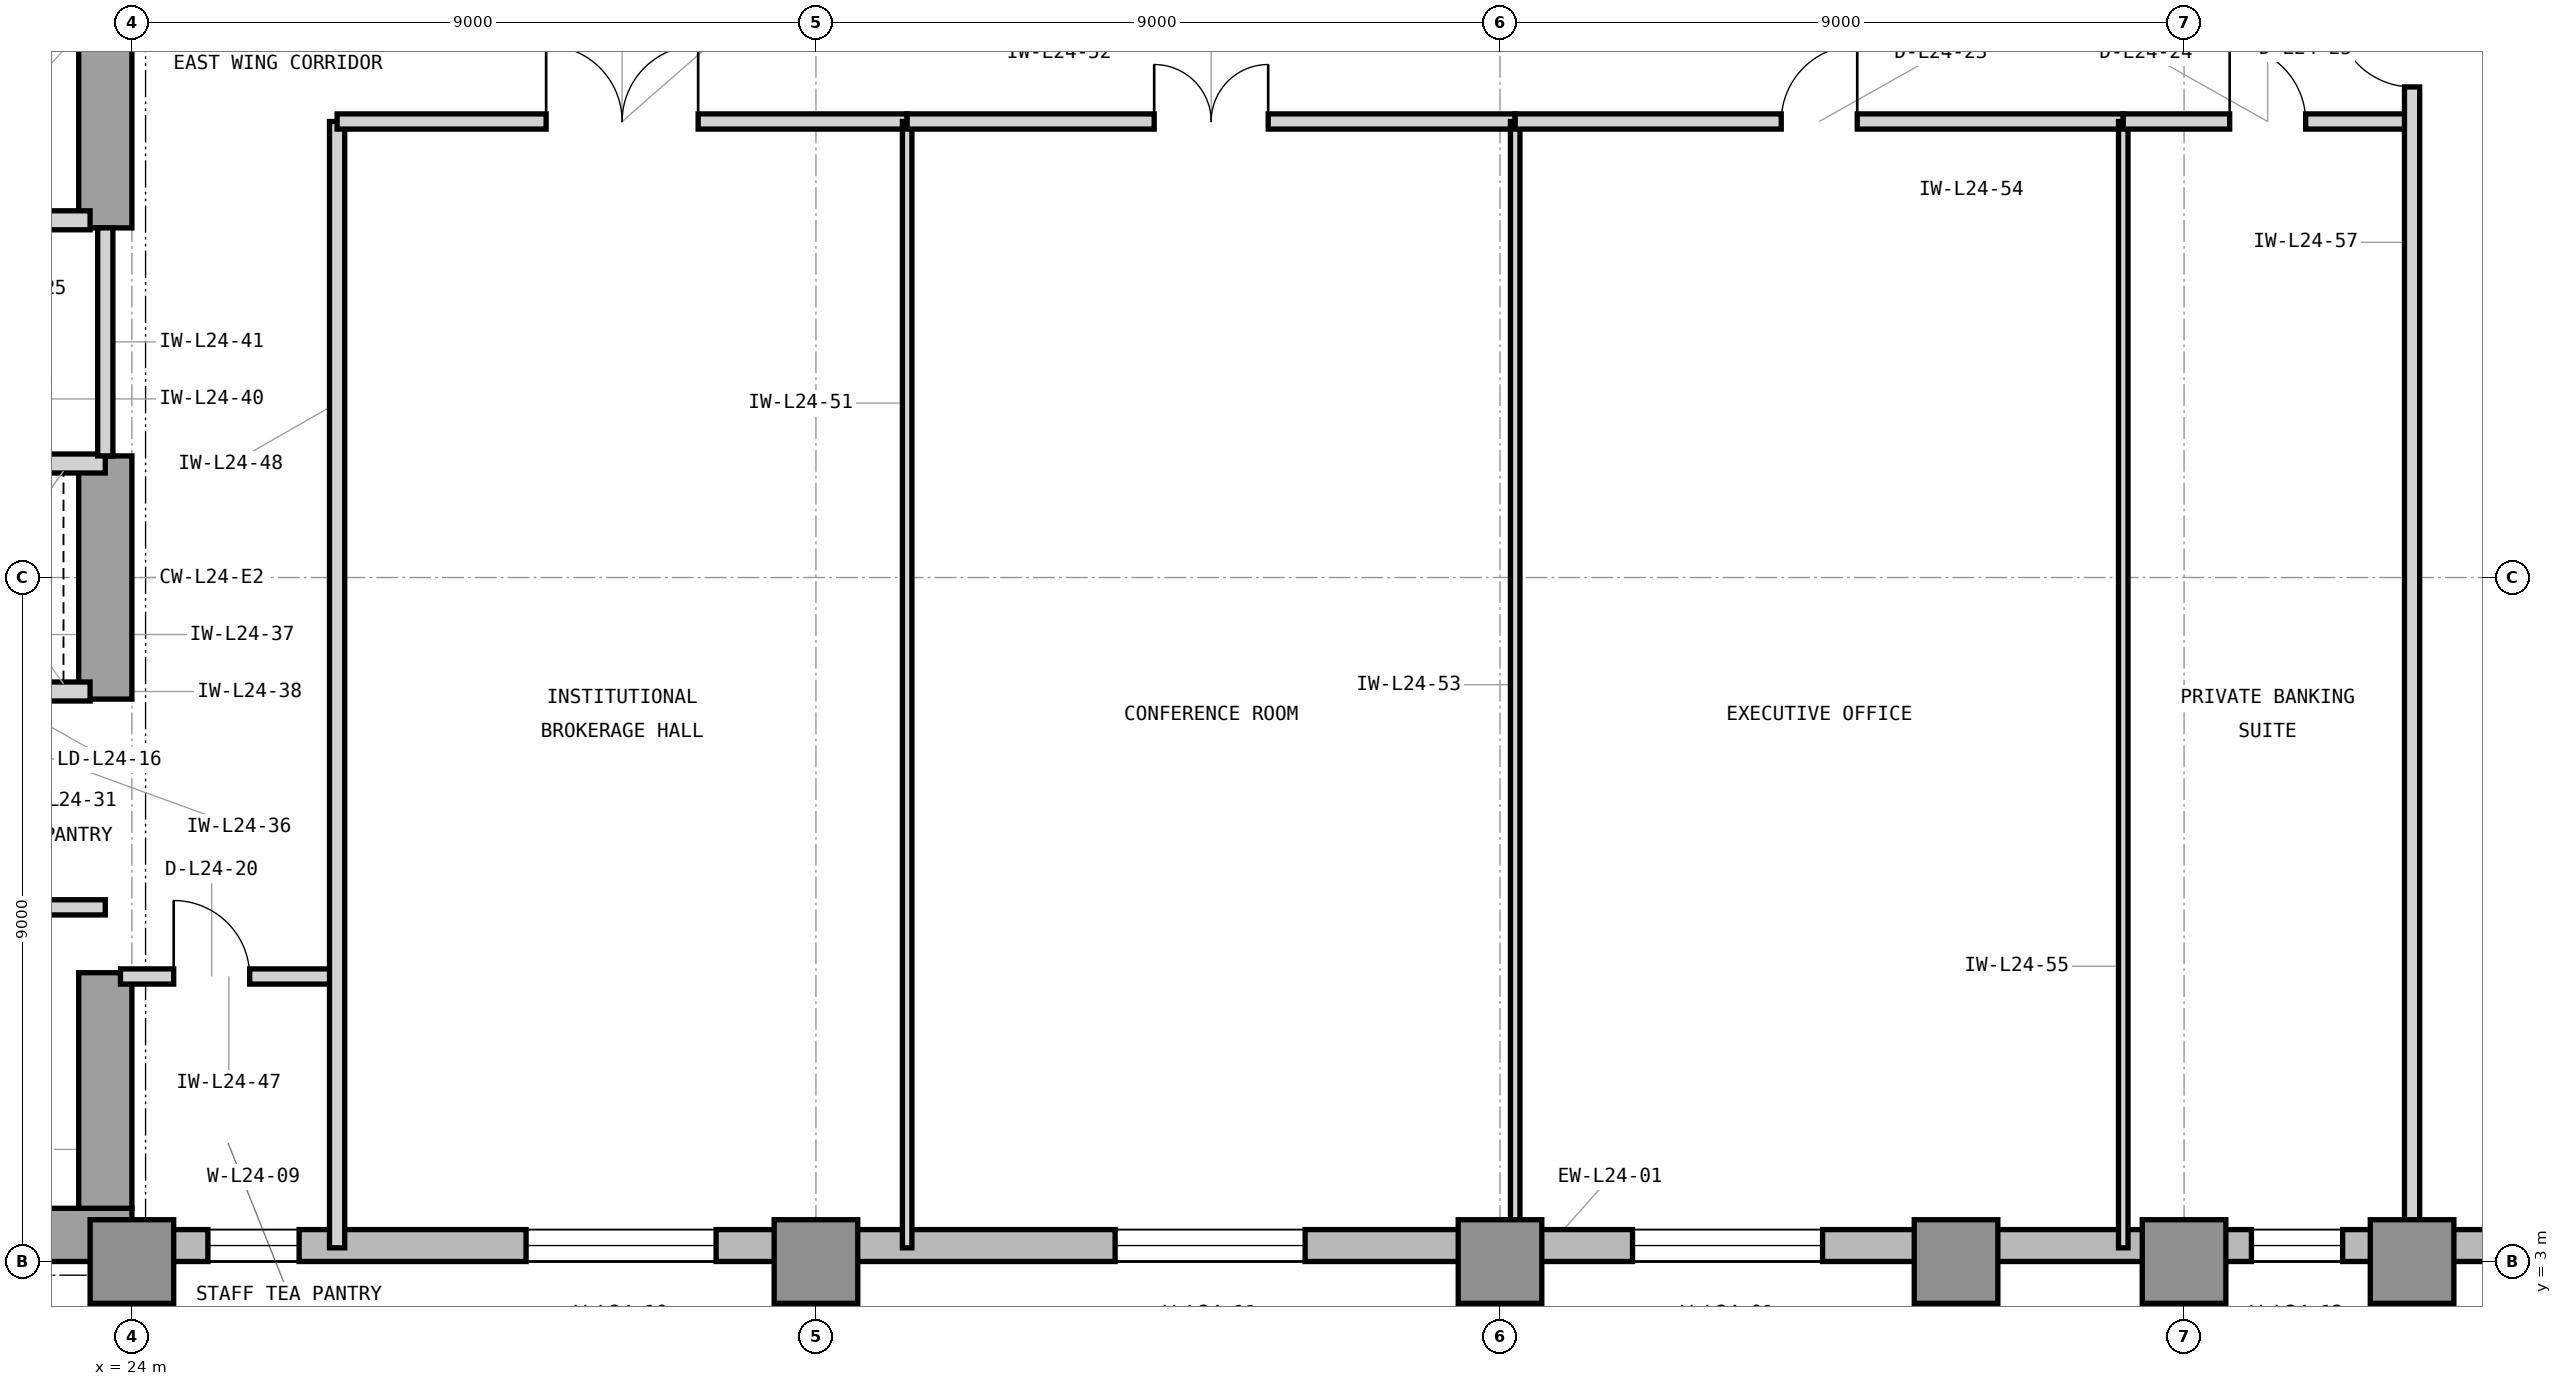
"""IFC4 building model, lengths in metres.
Left out: names, types, materials, properties, quantities, classifications, styles, units other than length and angle.
Written with IfcOpenShell. Run it as: python <this file> out.ifc"""

import sys

from ifc_helpers import new_model, si_unit, direction, frame, frame_2d, origin, origin_2d, place, context, subcontext, project, spatial, rectangle, extrude, element, fill, save


model = new_model("IFC4")
c1 = context("Model", 3, precision=1e-05, world=origin(), true_north=direction((0.0, 1.0)))
c2 = subcontext(c1, "Body", "Model", "MODEL_VIEW")
j1 = project(units=[si_unit("LENGTHUNIT", "METRE"), si_unit("PLANEANGLEUNIT", "RADIAN")], contexts=[c1])
p1 = place(None, origin())
s1 = spatial("IfcSite", under=j1, at=p1, CompositionType="ELEMENT")
p2 = place(p1, origin())
s2 = spatial("IfcBuilding", under=s1, at=p2, CompositionType="ELEMENT")
p3 = place(p2, frame((0.0, 0.0, 105.0)))
s3 = spatial("IfcBuildingStorey", under=s2, at=p3, CompositionType="ELEMENT", Elevation=105.0)
p4 = place(p3, frame((7.475, 3.35, 0.0), z_axis=(0.0, 0.0, 1.0), x_axis=(1.0, 0.0, 0.0)))
e1 = element("IfcWall", 1, at=p4, inside=s3, PredefinedType="SHEAR", context=c2, shape_type="SweptSolid", body=[
    extrude(rectangle(XDim=16.525, YDim=0.7, at=frame_2d((8.262, 0.0))), origin(), (0.0, 0.0, 1.0), 3.9),
])
p5 = place(p3, frame((23.65, 3.7, 0.0), z_axis=(0.0, 0.0, 1.0), x_axis=(0.0, 1.0, 0.0)))
e2 = element("IfcWall", 2, at=p5, inside=s3, PredefinedType="SHEAR", context=c2, shape_type="SweptSolid", body=[
    extrude(rectangle(XDim=3.1, YDim=0.7, at=frame_2d((1.55, 0.0))), origin(), (0.0, 0.0, 1.0), 3.9),
])
p6 = place(p3, frame((23.65, 10.4, 0.0), z_axis=(0.0, 0.0, 1.0), x_axis=(0.0, 1.0, 0.0)))
e3 = element("IfcWall", 3, at=p6, inside=s3, PredefinedType="SHEAR", context=c2, shape_type="SweptSolid", body=[
    extrude(rectangle(XDim=3.2, YDim=0.7, at=frame_2d((1.6, 0.0))), origin(), (0.0, 0.0, 1.0), 3.9),
])
p7 = place(p3, frame((23.65, 16.6, 0.0), z_axis=(0.0, 0.0, 1.0), x_axis=(0.0, 1.0, 0.0)))
e4 = element("IfcWall", 4, at=p7, inside=s3, PredefinedType="SHEAR", context=c2, shape_type="SweptSolid", body=[
    extrude(rectangle(XDim=4.05, YDim=0.7, at=frame_2d((2.025, 0.0))), origin(), (0.0, 0.0, 1.0), 3.9),
])
for number, where, z_axis, x_axis in (
    (5, (24.0, 3.0, 0.0), (0.0, 0.0, 1.0), (1.0, 0.0, 0.0)),
    (6, (33.0, 3.0, 0.0), (0.0, 0.0, 1.0), (1.0, 0.0, 0.0)),
    (7, (42.0, 3.0, 0.0), (0.0, 0.0, 1.0), (1.0, 0.0, 0.0)),
    (8, (48.0, 3.0, 0.0), (0.0, 0.0, 1.0), (1.0, 0.0, 0.0)),
    (9, (51.0, 3.0, 0.0), (0.0, 0.0, 1.0), (1.0, 0.0, 0.0)),
    (10, (54.0, 3.0, 0.0), (0.0, 0.0, 1.0), (1.0, 0.0, 0.0)),
):
    element("IfcColumn", number, at=place(p3, frame(where, z_axis=z_axis, x_axis=x_axis)), inside=s3, PredefinedType="COLUMN", context=c2, shape_type="SweptSolid", body=[
        extrude(rectangle(XDim=1.1, YDim=1.1, at=origin_2d()), origin(), (0.0, 0.0, 1.0), 3.9),
    ])
p8 = place(p3, frame((23.9, 3.21, 0.0), z_axis=(0.0, 0.0, 1.0), x_axis=(1.0, 0.0, 0.0)))
e11 = element("IfcWall", 11, at=p8, inside=s3, PredefinedType="STANDARD", context=c2, shape_type="SweptSolid", body=[
    extrude(rectangle(XDim=37.5, YDim=0.42, at=frame_2d((18.75, 0.0))), origin(), (0.0, 0.0, 1.0), 3.7),
])
p9 = place(p8, frame((19.844, 0.0, 0.85)))
e12 = element("IfcOpeningElement", 12, at=p9, cuts=e11, PredefinedType="OPENING", context=c2, shape_type="SweptSolid", body=[
    extrude(rectangle(XDim=2.5, YDim=2.25, at=frame_2d((1.25, 1.125))), frame((0.0, 0.22, 0.0), z_axis=(0.0, -1.0, 0.0), x_axis=(1.0, 0.0, 0.0)), (0.0, 0.0, 1.0), 0.44),
])
p10 = place(p8, frame((1.1, 0.0, 0.85)))
e13 = element("IfcOpeningElement", 13, at=p10, cuts=e11, PredefinedType="OPENING", context=c2, shape_type="SweptSolid", body=[
    extrude(rectangle(XDim=1.2, YDim=2.25, at=frame_2d((0.6, 1.125))), frame((0.0, 0.22, 0.0), z_axis=(0.0, -1.0, 0.0), x_axis=(1.0, 0.0, 0.0)), (0.0, 0.0, 1.0), 0.44),
])
p11 = place(p8, frame((5.286, 0.0, 0.85)))
e14 = element("IfcOpeningElement", 14, at=p11, cuts=e11, PredefinedType="OPENING", context=c2, shape_type="SweptSolid", body=[
    extrude(rectangle(XDim=2.5, YDim=2.25, at=frame_2d((1.25, 1.125))), frame((0.0, 0.22, 0.0), z_axis=(0.0, -1.0, 0.0), x_axis=(1.0, 0.0, 0.0)), (0.0, 0.0, 1.0), 0.44),
])
p12 = place(p8, frame((13.036, 0.0, 0.85)))
e15 = element("IfcOpeningElement", 15, at=p12, cuts=e11, PredefinedType="OPENING", context=c2, shape_type="SweptSolid", body=[
    extrude(rectangle(XDim=2.5, YDim=2.25, at=frame_2d((1.25, 1.125))), frame((0.0, 0.22, 0.0), z_axis=(0.0, -1.0, 0.0), x_axis=(1.0, 0.0, 0.0)), (0.0, 0.0, 1.0), 0.44),
])
p13 = place(p8, frame((27.986, 0.0, 0.85)))
e16 = element("IfcOpeningElement", 16, at=p13, cuts=e11, PredefinedType="OPENING", context=c2, shape_type="SweptSolid", body=[
    extrude(rectangle(XDim=1.2, YDim=2.25, at=frame_2d((0.6, 1.125))), frame((0.0, 0.22, 0.0), z_axis=(0.0, -1.0, 0.0), x_axis=(1.0, 0.0, 0.0)), (0.0, 0.0, 1.0), 0.44),
])
p14 = place(p3, frame((21.05, 16.7, 0.0), z_axis=(0.0, 0.0, 1.0), x_axis=(1.0, 0.0, 0.0)))
e17 = element("IfcWall", 17, at=p14, inside=s3, PredefinedType="PARTITIONING", context=c2, shape_type="SweptSolid", body=[
    extrude(rectangle(XDim=2.4, YDim=0.25, at=frame_2d((1.2, 0.0))), origin(), (0.0, 0.0, 1.0), 3.227),
])
p15 = place(p3, frame((20.8, 7.66, 0.0), z_axis=(0.0, 0.0, 1.0), x_axis=(1.0, 0.0, 0.0)))
e18 = element("IfcWall", 18, at=p15, inside=s3, PredefinedType="PARTITIONING", context=c2, shape_type="SweptSolid", body=[
    extrude(rectangle(XDim=2.85, YDim=0.2, at=frame_2d((1.425, 0.0))), origin(), (0.0, 0.0, 1.0), 3.69),
])
p16 = place(p15, frame((0.95, 0.0, 0.0)))
e19 = element("IfcOpeningElement", 19, at=p16, cuts=e18, PredefinedType="OPENING", context=c2, shape_type="SweptSolid", body=[
    extrude(rectangle(XDim=0.95, YDim=2.1, at=frame_2d((0.475, 1.05))), frame((0.0, 0.11, 0.0), z_axis=(0.0, -1.0, 0.0), x_axis=(1.0, 0.0, 0.0)), (0.0, 0.0, 1.0), 0.22),
])
p17 = place(p3, frame((21.05, 10.5, 0.0), z_axis=(0.0, 0.0, 1.0), x_axis=(1.0, 0.0, 0.0)))
e20 = element("IfcWall", 20, at=p17, inside=s3, PredefinedType="PARTITIONING", context=c2, shape_type="SweptSolid", body=[
    extrude(rectangle(XDim=2.4, YDim=0.25, at=frame_2d((1.2, 0.0))), origin(), (0.0, 0.0, 1.0), 3.227),
])
p18 = place(p17, frame((0.48, 0.0, 0.0)))
e21 = element("IfcOpeningElement", 21, at=p18, cuts=e20, PredefinedType="OPENING", context=c2, shape_type="SweptSolid", body=[
    extrude(rectangle(XDim=1.15, YDim=2.25, at=frame_2d((0.575, 1.125))), frame((0.0, 0.135, 0.0), z_axis=(0.0, -1.0, 0.0), x_axis=(1.0, 0.0, 0.0)), (0.0, 0.0, 1.0), 0.27),
])
p19 = place(p3, frame((14.7, 13.5, 0.0), z_axis=(0.0, 0.0, 1.0), x_axis=(1.0, 0.0, 0.0)))
e22 = element("IfcWall", 22, at=p19, inside=s3, PredefinedType="PARTITIONING", context=c2, shape_type="SweptSolid", body=[
    extrude(rectangle(XDim=8.95, YDim=0.25, at=frame_2d((4.475, 0.0))), origin(), (0.0, 0.0, 1.0), 3.227),
])
p20 = place(p3, frame((23.65, 13.6, 0.0), z_axis=(0.0, 0.0, 1.0), x_axis=(0.0, 1.0, 0.0)))
e23 = element("IfcWall", 23, at=p20, inside=s3, PredefinedType="PARTITIONING", context=c2, shape_type="SweptSolid", body=[
    extrude(rectangle(XDim=3.0, YDim=0.2, at=frame_2d((1.5, 0.0))), origin(), (0.0, 0.0, 1.0), 3.69),
])
p21 = place(p3, frame((23.85, 6.75, 0.0), z_axis=(0.0, 0.0, 1.0), x_axis=(1.0, 0.0, 0.0)))
e24 = element("IfcWall", 24, at=p21, inside=s3, PredefinedType="PARTITIONING", context=c2, shape_type="SweptSolid", body=[
    extrude(rectangle(XDim=2.85, YDim=0.2, at=frame_2d((1.425, 0.0))), origin(), (0.0, 0.0, 1.0), 3.69),
])
p22 = place(p21, frame((0.7, 0.0, 0.0)))
e25 = element("IfcOpeningElement", 25, at=p22, cuts=e24, PredefinedType="OPENING", context=c2, shape_type="SweptSolid", body=[
    extrude(rectangle(XDim=1.0, YDim=2.15, at=frame_2d((0.5, 1.075))), frame((0.0, 0.11, 0.0), z_axis=(0.0, -1.0, 0.0), x_axis=(1.0, 0.0, 0.0)), (0.0, 0.0, 1.0), 0.22),
])
p23 = place(p3, frame((26.7, 3.18, 0.0), z_axis=(0.0, 0.0, 1.0), x_axis=(0.0, 1.0, 0.0)))
e26 = element("IfcWall", 26, at=p23, inside=s3, PredefinedType="PARTITIONING", context=c2, shape_type="SweptSolid", body=[
    extrude(rectangle(XDim=14.82, YDim=0.2, at=frame_2d((7.41, 0.0))), origin(), (0.0, 0.0, 1.0), 3.69),
])
p24 = place(p3, frame((26.7, 18.0, 0.0), z_axis=(0.0, 0.0, 1.0), x_axis=(1.0, 0.0, 0.0)))
e27 = element("IfcWall", 27, at=p24, inside=s3, PredefinedType="PARTITIONING", context=c2, shape_type="SweptSolid", body=[
    extrude(rectangle(XDim=7.5, YDim=0.2, at=frame_2d((3.75, 0.0))), origin(), (0.0, 0.0, 1.0), 3.227),
])
p25 = place(p24, frame((2.75, 0.0, 0.0)))
e28 = element("IfcOpeningElement", 28, at=p25, cuts=e27, PredefinedType="OPENING", context=c2, shape_type="SweptSolid", body=[
    extrude(rectangle(XDim=2.0, YDim=2.5, at=frame_2d((1.0, 1.25))), frame((0.0, 0.11, 0.0), z_axis=(0.0, -1.0, 0.0), x_axis=(1.0, 0.0, 0.0)), (0.0, 0.0, 1.0), 0.22),
])
p26 = place(p3, frame((34.2, 3.18, 0.0), z_axis=(0.0, 0.0, 1.0), x_axis=(0.0, 1.0, 0.0)))
e29 = element("IfcWall", 29, at=p26, inside=s3, PredefinedType="PARTITIONING", context=c2, shape_type="SweptSolid", body=[
    extrude(rectangle(XDim=14.82, YDim=0.125, at=frame_2d((7.41, 0.0))), origin(), (0.0, 0.0, 1.0), 3.69),
])
p27 = place(p3, frame((34.2, 18.0, 0.0), z_axis=(0.0, 0.0, 1.0), x_axis=(1.0, 0.0, 0.0)))
e30 = element("IfcWall", 30, at=p27, inside=s3, PredefinedType="PARTITIONING", context=c2, shape_type="SweptSolid", body=[
    extrude(rectangle(XDim=8.0, YDim=0.2, at=frame_2d((4.0, 0.0))), origin(), (0.0, 0.0, 1.0), 3.227),
])
p28 = place(p27, frame((3.25, 0.0, 0.0)))
e31 = element("IfcOpeningElement", 31, at=p28, cuts=e30, PredefinedType="OPENING", context=c2, shape_type="SweptSolid", body=[
    extrude(rectangle(XDim=1.5, YDim=2.3, at=frame_2d((0.75, 1.15))), frame((0.0, 0.11, 0.0), z_axis=(0.0, -1.0, 0.0), x_axis=(1.0, 0.0, 0.0)), (0.0, 0.0, 1.0), 0.22),
])
p29 = place(p3, frame((42.2, 3.18, 0.0), z_axis=(0.0, 0.0, 1.0), x_axis=(0.0, 1.0, 0.0)))
e32 = element("IfcWall", 32, at=p29, inside=s3, PredefinedType="PARTITIONING", context=c2, shape_type="SweptSolid", body=[
    extrude(rectangle(XDim=14.82, YDim=0.125, at=frame_2d((7.41, 0.0))), origin(), (0.0, 0.0, 1.0), 3.69),
])
p30 = place(p3, frame((42.2, 18.0, 0.0), z_axis=(0.0, 0.0, 1.0), x_axis=(1.0, 0.0, 0.0)))
e33 = element("IfcWall", 33, at=p30, inside=s3, PredefinedType="PARTITIONING", context=c2, shape_type="SweptSolid", body=[
    extrude(rectangle(XDim=8.0, YDim=0.2, at=frame_2d((4.0, 0.0))), origin(), (0.0, 0.0, 1.0), 3.227),
])
p31 = place(p30, frame((3.5, 0.0, 0.0)))
e34 = element("IfcOpeningElement", 34, at=p31, cuts=e33, PredefinedType="OPENING", context=c2, shape_type="SweptSolid", body=[
    extrude(rectangle(XDim=1.0, YDim=2.15, at=frame_2d((0.5, 1.075))), frame((0.0, 0.11, 0.0), z_axis=(0.0, -1.0, 0.0), x_axis=(1.0, 0.0, 0.0)), (0.0, 0.0, 1.0), 0.22),
])
p32 = place(p3, frame((50.2, 3.18, 0.0), z_axis=(0.0, 0.0, 1.0), x_axis=(0.0, 1.0, 0.0)))
e35 = element("IfcWall", 35, at=p32, inside=s3, PredefinedType="PARTITIONING", context=c2, shape_type="SweptSolid", body=[
    extrude(rectangle(XDim=14.82, YDim=0.125, at=frame_2d((7.41, 0.0))), origin(), (0.0, 0.0, 1.0), 3.69),
])
p33 = place(p3, frame((50.2, 18.0, 0.0), z_axis=(0.0, 0.0, 1.0), x_axis=(1.0, 0.0, 0.0)))
e36 = element("IfcWall", 36, at=p33, inside=s3, PredefinedType="PARTITIONING", context=c2, shape_type="SweptSolid", body=[
    extrude(rectangle(XDim=3.8, YDim=0.2, at=frame_2d((1.9, 0.0))), origin(), (0.0, 0.0, 1.0), 3.227),
])
p34 = place(p33, frame((1.4, 0.0, 0.0)))
e37 = element("IfcOpeningElement", 37, at=p34, cuts=e36, PredefinedType="OPENING", context=c2, shape_type="SweptSolid", body=[
    extrude(rectangle(XDim=1.0, YDim=2.15, at=frame_2d((0.5, 1.075))), frame((0.0, 0.11, 0.0), z_axis=(0.0, -1.0, 0.0), x_axis=(1.0, 0.0, 0.0)), (0.0, 0.0, 1.0), 0.22),
])
p35 = place(p3, frame((54.0, 3.18, 0.0), z_axis=(0.0, 0.0, 1.0), x_axis=(0.0, 1.0, 0.0)))
e38 = element("IfcWall", 38, at=p35, inside=s3, PredefinedType="PARTITIONING", context=c2, shape_type="SweptSolid", body=[
    extrude(rectangle(XDim=17.64, YDim=0.2, at=frame_2d((8.82, 0.0))), origin(), (0.0, 0.0, 1.0), 2.917),
])
p36 = place(p35, frame((15.275, 0.0, 0.0)))
e39 = element("IfcOpeningElement", 39, at=p36, cuts=e38, PredefinedType="OPENING", context=c2, shape_type="SweptSolid", body=[
    extrude(rectangle(XDim=1.0, YDim=2.15, at=frame_2d((0.5, 1.075))), frame((0.0, 0.11, 0.0), z_axis=(0.0, -1.0, 0.0), x_axis=(1.0, 0.0, 0.0)), (0.0, 0.0, 1.0), 0.22),
])
p37 = place(p9, origin())
e40 = element("IfcWindow", 40, at=p37, inside=s3, PartitioningType="SINGLE_PANEL", PredefinedType="WINDOW", context=c2, shape_type="SweptSolid", body=[
    extrude(rectangle(XDim=2.5, YDim=2.25, at=frame_2d((1.25, 1.125))), frame((0.0, 0.11, 0.0), z_axis=(0.0, -1.0, 0.0), x_axis=(1.0, 0.0, 0.0)), (0.0, 0.0, 1.0), 0.06),
])
fill(e12, e40)
p38 = place(p22, origin())
e41 = element("IfcDoor", 41, at=p38, inside=s3, OperationType="SINGLE_SWING_LEFT", PredefinedType="DOOR", context=c2, shape_type="SweptSolid", body=[
    extrude(rectangle(XDim=1.0, YDim=2.15, at=frame_2d((0.5, 1.075))), frame((0.0, 0.025, 0.0), z_axis=(0.0, -1.0, 0.0), x_axis=(1.0, 0.0, 0.0)), (0.0, 0.0, 1.0), 0.05),
])
fill(e25, e41)
p39 = place(p25, origin())
e42 = element("IfcDoor", 42, at=p39, inside=s3, OperationType="DOUBLE_DOOR_SINGLE_SWING", PredefinedType="DOOR", context=c2, shape_type="SweptSolid", body=[
    extrude(rectangle(XDim=2.0, YDim=2.5, at=frame_2d((1.0, 1.25))), frame((0.0, 0.025, 0.0), z_axis=(0.0, -1.0, 0.0), x_axis=(1.0, 0.0, 0.0)), (0.0, 0.0, 1.0), 0.05),
])
fill(e28, e42)
p40 = place(p28, origin())
e43 = element("IfcDoor", 43, at=p40, inside=s3, OperationType="DOUBLE_DOOR_SINGLE_SWING", PredefinedType="DOOR", context=c2, shape_type="SweptSolid", body=[
    extrude(rectangle(XDim=1.5, YDim=2.3, at=frame_2d((0.75, 1.15))), frame((0.0, 0.025, 0.0), z_axis=(0.0, -1.0, 0.0), x_axis=(1.0, 0.0, 0.0)), (0.0, 0.0, 1.0), 0.05),
])
fill(e31, e43)
p41 = place(p31, origin())
e44 = element("IfcDoor", 44, at=p41, inside=s3, OperationType="SINGLE_SWING_RIGHT", PredefinedType="DOOR", context=c2, shape_type="SweptSolid", body=[
    extrude(rectangle(XDim=1.0, YDim=2.15, at=frame_2d((0.5, 1.075))), frame((0.0, 0.025, 0.0), z_axis=(0.0, -1.0, 0.0), x_axis=(1.0, 0.0, 0.0)), (0.0, 0.0, 1.0), 0.05),
])
fill(e34, e44)
p42 = place(p34, origin())
e45 = element("IfcDoor", 45, at=p42, inside=s3, OperationType="SINGLE_SWING_LEFT", PredefinedType="DOOR", context=c2, shape_type="SweptSolid", body=[
    extrude(rectangle(XDim=1.0, YDim=2.15, at=frame_2d((0.5, 1.075))), frame((0.0, 0.025, 0.0), z_axis=(0.0, -1.0, 0.0), x_axis=(1.0, 0.0, 0.0)), (0.0, 0.0, 1.0), 0.05),
])
fill(e37, e45)
p43 = place(p36, origin())
e46 = element("IfcDoor", 46, at=p43, inside=s3, OperationType="SINGLE_SWING_RIGHT", PredefinedType="DOOR", context=c2, shape_type="SweptSolid", body=[
    extrude(rectangle(XDim=1.0, YDim=2.15, at=frame_2d((0.5, 1.075))), frame((0.0, 0.025, 0.0), z_axis=(0.0, -1.0, 0.0), x_axis=(1.0, 0.0, 0.0)), (0.0, 0.0, 1.0), 0.05),
])
fill(e39, e46)
p44 = place(p10, origin())
e47 = element("IfcWindow", 47, at=p44, inside=s3, PartitioningType="SINGLE_PANEL", PredefinedType="WINDOW", context=c2, shape_type="SweptSolid", body=[
    extrude(rectangle(XDim=1.2, YDim=2.25, at=frame_2d((0.6, 1.125))), frame((0.0, 0.11, 0.0), z_axis=(0.0, -1.0, 0.0), x_axis=(1.0, 0.0, 0.0)), (0.0, 0.0, 1.0), 0.06),
])
fill(e13, e47)
p45 = place(p11, origin())
e48 = element("IfcWindow", 48, at=p45, inside=s3, PartitioningType="SINGLE_PANEL", PredefinedType="WINDOW", context=c2, shape_type="SweptSolid", body=[
    extrude(rectangle(XDim=2.5, YDim=2.25, at=frame_2d((1.25, 1.125))), frame((0.0, 0.11, 0.0), z_axis=(0.0, -1.0, 0.0), x_axis=(1.0, 0.0, 0.0)), (0.0, 0.0, 1.0), 0.06),
])
fill(e14, e48)
p46 = place(p12, origin())
e49 = element("IfcWindow", 49, at=p46, inside=s3, PartitioningType="SINGLE_PANEL", PredefinedType="WINDOW", context=c2, shape_type="SweptSolid", body=[
    extrude(rectangle(XDim=2.5, YDim=2.25, at=frame_2d((1.25, 1.125))), frame((0.0, 0.11, 0.0), z_axis=(0.0, -1.0, 0.0), x_axis=(1.0, 0.0, 0.0)), (0.0, 0.0, 1.0), 0.06),
])
fill(e15, e49)
p47 = place(p13, origin())
e50 = element("IfcWindow", 50, at=p47, inside=s3, PartitioningType="SINGLE_PANEL", PredefinedType="WINDOW", context=c2, shape_type="SweptSolid", body=[
    extrude(rectangle(XDim=1.2, YDim=2.25, at=frame_2d((0.6, 1.125))), frame((0.0, 0.11, 0.0), z_axis=(0.0, -1.0, 0.0), x_axis=(1.0, 0.0, 0.0)), (0.0, 0.0, 1.0), 0.06),
])
fill(e16, e50)
save(model, sys.argv[1])
